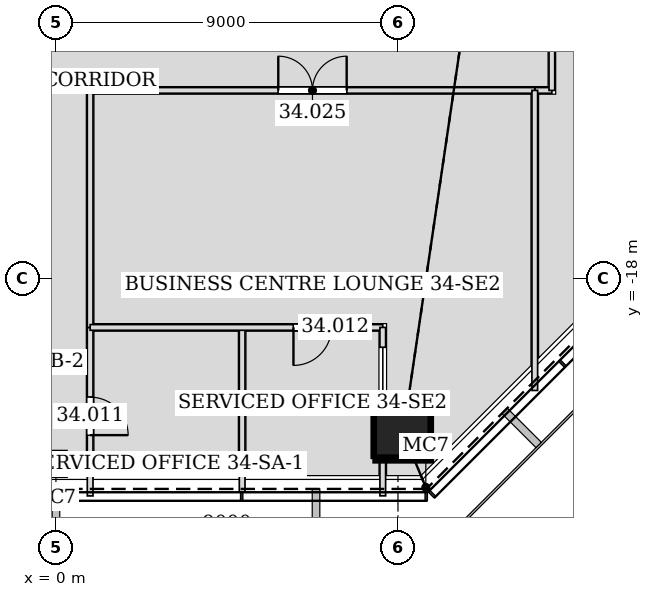
"""IFC4 building model, lengths in metres.
Left out: names, types, materials, properties, quantities, classifications, styles, units other than length and angle.
Written with IfcOpenShell. Run it as: python <this file> out.ifc"""

import sys

from ifc_helpers import new_model, si_unit, direction, frame, frame_2d, origin, origin_2d, place, context, subcontext, project, spatial, rectangle, hollow_rectangle, extrude, element, fill, save


model = new_model("IFC4")
c1 = context("Model", 3, precision=1e-05, world=origin(), true_north=direction((0.0, 1.0)))
c2 = subcontext(c1, "Body", "Model", "MODEL_VIEW")
j1 = project(units=[si_unit("LENGTHUNIT", "METRE"), si_unit("PLANEANGLEUNIT", "RADIAN")], contexts=[c1])
p1 = place(None, origin())
s1 = spatial("IfcSite", under=j1, at=p1, CompositionType="ELEMENT")
p2 = place(p1, origin())
s2 = spatial("IfcBuilding", under=s1, at=p2, CompositionType="ELEMENT")
p3 = place(p2, frame((0.0, 0.0, 151.2)))
s3 = spatial("IfcBuildingStorey", under=s2, at=p3, CompositionType="ELEMENT", Elevation=151.2)
p4 = place(p3, frame((9.137, -22.059, 0.0), z_axis=(-0.011678533143, 0.028295749455, 0.999531371407), x_axis=(-0.924363308851, -0.38151339852, 0.0)))
e1 = element("IfcColumn", 1, at=p4, inside=s3, PredefinedType="COLUMN", context=c2, shape_type="SweptSolid", body=[
    extrude(hollow_rectangle(XDim=1.5, YDim=1.5, WallThickness=0.07, at=origin_2d()), origin(), (0.0, 0.0, 1.0), 4.202),
])
p5 = place(p3, frame((0.0, -22.938, 0.0), z_axis=(0.0, 0.028297679255, 0.99959954049), x_axis=(-1.0, 0.0, 0.0)))
e2 = element("IfcColumn", 2, at=p5, inside=s3, PredefinedType="COLUMN", context=c2, shape_type="SweptSolid", body=[
    extrude(hollow_rectangle(XDim=0.5, YDim=0.5, WallThickness=0.025, at=origin_2d()), origin(), (0.0, 0.0, 1.0), 4.202),
])
p6 = place(p3, frame((0.9, -23.721, 0.0), z_axis=(0.0, 0.0, 1.0), x_axis=(0.0, 1.0, 0.0)))
e3 = element("IfcWall", 3, at=p6, inside=s3, PredefinedType="PARTITIONING", context=c2, shape_type="SweptSolid", body=[
    extrude(rectangle(XDim=4.435, YDim=0.15, at=frame_2d((2.217, 0.0))), origin(), (0.0, 0.0, 1.0), 3.426),
])
p7 = place(p6, frame((1.6, 0.0, 0.0)))
e4 = element("IfcOpeningElement", 4, at=p7, cuts=e3, PredefinedType="OPENING", context=c2, shape_type="SweptSolid", body=[
    extrude(rectangle(XDim=1.0, YDim=2.1, at=frame_2d((0.5, 1.05))), frame((0.0, 0.085, 0.0), z_axis=(0.0, -1.0, 0.0), x_axis=(1.0, 0.0, 0.0)), (0.0, 0.0, 1.0), 0.17),
])
p8 = place(p3, frame((12.599, -13.05, 0.0), z_axis=(0.0, 0.0, 1.0), x_axis=(1.0, 0.0, 0.0)))
e5 = element("IfcWall", 5, at=p8, inside=s3, PredefinedType="PARTITIONING", context=c2, shape_type="SweptSolid", body=[
    extrude(rectangle(XDim=0.451, YDim=0.15, at=frame_2d((0.226, 0.0))), origin(), (0.0, 0.0, 1.0), 3.263),
])
p9 = place(p3, frame((13.05, -13.05, 0.0), z_axis=(0.0, 0.0, 1.0), x_axis=(0.0, 1.0, 0.0)))
e6 = element("IfcWall", 6, at=p9, inside=s3, PredefinedType="PARTITIONING", context=c2, shape_type="SweptSolid", body=[
    extrude(rectangle(XDim=12.15, YDim=0.15, at=frame_2d((6.075, 0.0))), origin(), (0.0, 0.0, 1.0), 3.098),
])
p10 = place(p9, frame((5.175, 0.0, 0.0)))
e7 = element("IfcOpeningElement", 7, at=p10, cuts=e6, PredefinedType="OPENING", context=c2, shape_type="SweptSolid", body=[
    extrude(rectangle(XDim=1.8, YDim=2.4, at=frame_2d((0.9, 1.2))), frame((0.0, 0.085, 0.0), z_axis=(0.0, -1.0, 0.0), x_axis=(1.0, 0.0, 0.0)), (0.0, 0.0, 1.0), 0.17),
])
p11 = place(p3, frame((0.9, -19.289, 0.0), z_axis=(0.0, 0.0, 1.0), x_axis=(0.0, 1.0, 0.0)))
e8 = element("IfcWall", 8, at=p11, inside=s3, PredefinedType="PARTITIONING", context=c2, shape_type="SweptSolid", body=[
    extrude(rectangle(XDim=6.239, YDim=0.15, at=frame_2d((3.119, 0.0))), origin(), (0.0, 0.0, 1.0), 3.426),
])
p12 = place(p3, frame((0.9, -13.05, 0.0), z_axis=(0.0, 0.0, 1.0), x_axis=(1.0, 0.0, 0.0)))
e9 = element("IfcWall", 9, at=p12, inside=s3, PredefinedType="PARTITIONING", context=c2, shape_type="SweptSolid", body=[
    extrude(rectangle(XDim=11.701, YDim=0.15, at=frame_2d((5.851, 0.0))), origin(), (0.0, 0.0, 1.0), 3.098),
])
p13 = place(p12, frame((4.95, 0.0, 0.0)))
e10 = element("IfcOpeningElement", 10, at=p13, cuts=e9, PredefinedType="OPENING", context=c2, shape_type="SweptSolid", body=[
    extrude(rectangle(XDim=1.8, YDim=2.4, at=frame_2d((0.9, 1.2))), frame((0.0, 0.085, 0.0), z_axis=(0.0, -1.0, 0.0), x_axis=(1.0, 0.0, 0.0)), (0.0, 0.0, 1.0), 0.17),
])
p14 = place(p3, frame((4.9, -23.62, 0.0), z_axis=(0.0, 0.0, 1.0), x_axis=(0.0, 1.0, 0.0)))
e11 = element("IfcWall", 11, at=p14, inside=s3, PredefinedType="PARTITIONING", context=c2, shape_type="SweptSolid", body=[
    extrude(rectangle(XDim=4.333, YDim=0.15, at=frame_2d((2.166, 0.0))), origin(), (0.0, 0.0, 1.0), 3.426),
])
p15 = place(p3, frame((0.9, -19.288, 0.0), z_axis=(0.0, 0.0, 1.0), x_axis=(1.0, 0.0, 0.0)))
e12 = element("IfcWall", 12, at=p15, inside=s3, PredefinedType="PARTITIONING", context=c2, shape_type="SweptSolid", body=[
    extrude(rectangle(XDim=7.7, YDim=0.15, at=frame_2d((3.85, 0.0))), origin(), (0.0, 0.0, 1.0), 4.035),
])
p16 = place(p15, frame((5.35, 0.0, 0.0)))
e13 = element("IfcOpeningElement", 13, at=p16, cuts=e12, PredefinedType="OPENING", context=c2, shape_type="SweptSolid", body=[
    extrude(rectangle(XDim=1.0, YDim=2.1, at=frame_2d((0.5, 1.05))), frame((0.0, 0.085, 0.0), z_axis=(0.0, -1.0, 0.0), x_axis=(1.0, 0.0, 0.0)), (0.0, 0.0, 1.0), 0.17),
])
p17 = place(p3, frame((8.6, -23.719, 0.0), z_axis=(0.0, 0.0, 1.0), x_axis=(0.0, 1.0, 0.0)))
e14 = element("IfcWall", 14, at=p17, inside=s3, PredefinedType="PARTITIONING", context=c2, shape_type="SweptSolid", body=[
    extrude(rectangle(XDim=0.948, YDim=0.15, at=frame_2d((0.474, 0.0))), origin(), (0.0, 0.0, 1.0), 4.035),
])
p18 = place(p3, frame((8.6, -21.31, 0.0), z_axis=(0.0, 0.0, 1.0), x_axis=(0.0, 1.0, 0.0)))
e15 = element("IfcWall", 15, at=p18, inside=s3, PredefinedType="PARTITIONING", context=c2, shape_type="SweptSolid", body=[
    extrude(rectangle(XDim=2.022, YDim=0.15, at=frame_2d((1.011, 0.0))), origin(), (0.0, 0.0, 1.0), 3.426),
])
p19 = place(p3, frame((12.6, -13.05, 0.0), z_axis=(0.0, 0.0, 1.0), x_axis=(0.0, -1.0, 0.0)))
e16 = element("IfcWall", 16, at=p19, inside=s3, PredefinedType="PARTITIONING", context=c2, shape_type="SweptSolid", body=[
    extrude(rectangle(XDim=7.896, YDim=0.15, at=frame_2d((3.948, 0.0))), origin(), (0.0, 0.0, 1.0), 3.499),
])
p20 = place(p7, frame((1.0, 0.0, 0.0), z_axis=(0.0, 0.0, 1.0), x_axis=(-1.0, 0.0, 0.0)))
e17 = element("IfcDoor", 17, at=p20, inside=s3, OperationType="SINGLE_SWING_RIGHT", PredefinedType="DOOR", context=c2, shape_type="SweptSolid", body=[
    extrude(rectangle(XDim=1.0, YDim=2.1, at=frame_2d((0.5, 1.05))), frame((0.0, 0.025, 0.0), z_axis=(0.0, -1.0, 0.0), x_axis=(1.0, 0.0, 0.0)), (0.0, 0.0, 1.0), 0.05),
])
fill(e4, e17)
p21 = place(p16, frame((1.0, 0.0, 0.0), z_axis=(0.0, 0.0, 1.0), x_axis=(-1.0, 0.0, 0.0)))
e18 = element("IfcDoor", 18, at=p21, inside=s3, OperationType="SINGLE_SWING_RIGHT", PredefinedType="DOOR", context=c2, shape_type="SweptSolid", body=[
    extrude(rectangle(XDim=1.0, YDim=2.1, at=frame_2d((0.5, 1.05))), frame((0.0, 0.025, 0.0), z_axis=(0.0, -1.0, 0.0), x_axis=(1.0, 0.0, 0.0)), (0.0, 0.0, 1.0), 0.05),
])
fill(e13, e18)
p22 = place(p13, origin())
e19 = element("IfcDoor", 19, at=p22, inside=s3, OperationType="DOUBLE_DOOR_SINGLE_SWING", PredefinedType="DOOR", context=c2, shape_type="SweptSolid", body=[
    extrude(rectangle(XDim=1.8, YDim=2.4, at=frame_2d((0.9, 1.2))), frame((0.0, 0.025, 0.0), z_axis=(0.0, -1.0, 0.0), x_axis=(1.0, 0.0, 0.0)), (0.0, 0.0, 1.0), 0.05),
])
fill(e10, e19)
save(model, sys.argv[1])
